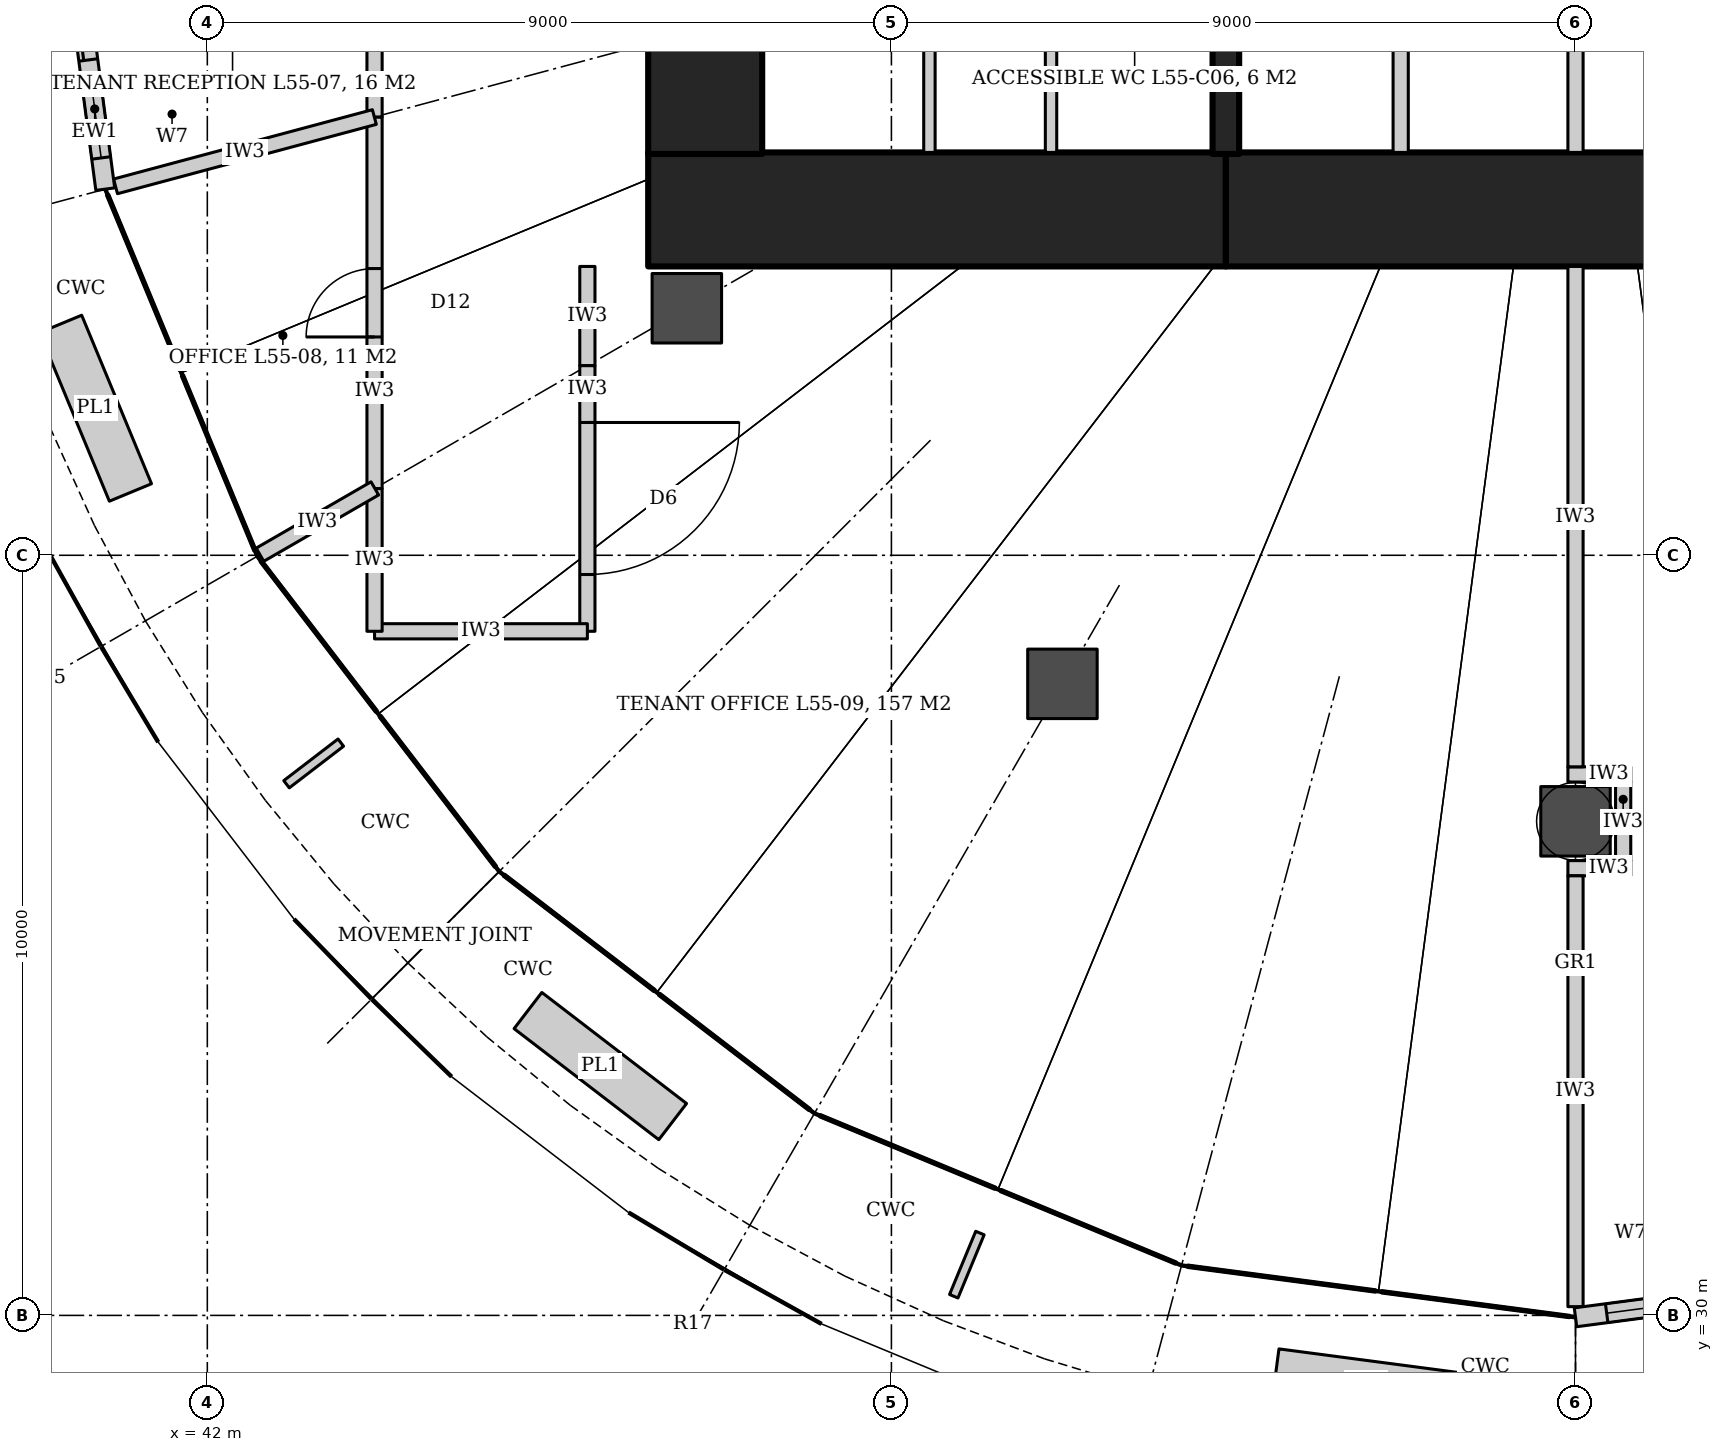
"""IFC4 building model, lengths in metres.
Left out: names, types, materials, properties, quantities, classifications, styles, units other than length and angle.
Written with IfcOpenShell. Run it as: python <this file> out.ifc"""

import sys

from ifc_helpers import new_model, si_unit, direction, frame, frame_2d, origin, origin_2d, place, context, subcontext, project, spatial, rectangle, hollow_circle, extrude, element, fill, save


model = new_model("IFC4")
c1 = context("Model", 3, precision=1e-05, world=origin(), true_north=direction((0.0, 1.0)))
c2 = subcontext(c1, "Body", "Model", "MODEL_VIEW")
j1 = project(units=[si_unit("LENGTHUNIT", "METRE"), si_unit("PLANEANGLEUNIT", "RADIAN")], contexts=[c1])
p1 = place(None, origin())
s1 = spatial("IfcSite", under=j1, at=p1, CompositionType="ELEMENT")
p2 = place(p1, origin())
s2 = spatial("IfcBuilding", under=s1, at=p2, CompositionType="ELEMENT")
p3 = place(p2, frame((0.0, 0.0, 240.2)))
s3 = spatial("IfcBuildingStorey", under=s2, at=p3, CompositionType="ELEMENT", Elevation=240.2)
p4 = place(p3, frame((47.8, 44.55, 0.0), z_axis=(0.0, 0.0, 1.0), x_axis=(1.0, 0.0, 0.0)))
e1 = element("IfcWall", 1, at=p4, inside=s3, PredefinedType="SHEAR", context=c2, shape_type="SweptSolid", body=[
    extrude(rectangle(XDim=7.6, YDim=1.5, at=frame_2d((3.8, 0.0))), origin(), (0.0, 0.0, 1.0), 4.2),
])
p5 = place(p3, frame((55.4, 44.55, 0.0), z_axis=(0.0, 0.0, 1.0), x_axis=(1.0, 0.0, 0.0)))
e2 = element("IfcWall", 2, at=p5, inside=s3, PredefinedType="SHEAR", context=c2, shape_type="SweptSolid", body=[
    extrude(rectangle(XDim=9.2, YDim=1.5, at=frame_2d((4.6, 0.0))), origin(), (0.0, 0.0, 1.0), 4.2),
])
p6 = place(p3, frame((48.55, 45.28, 0.0), z_axis=(0.0, 0.0, 1.0), x_axis=(0.0, 1.0, 0.0)))
e3 = element("IfcWall", 3, at=p6, inside=s3, PredefinedType="SHEAR", context=c2, shape_type="SweptSolid", body=[
    extrude(rectangle(XDim=3.22, YDim=1.5, at=frame_2d((1.61, 0.0))), origin(), (0.0, 0.0, 1.0), 4.2),
])
p7 = place(p3, frame((55.4, 48.345, 0.0), z_axis=(0.0, 0.0, 1.0), x_axis=(0.0, -1.0, 0.0)))
e4 = element("IfcWall", 4, at=p7, inside=s3, PredefinedType="SHEAR", context=c2, shape_type="SweptSolid", body=[
    extrude(rectangle(XDim=3.065, YDim=0.35, at=frame_2d((1.532, 0.0))), origin(), (0.0, 0.0, 1.0), 4.2),
])
for number, where, z_axis, x_axis in (
    (5, (48.309, 43.25, 0.0), (0.0, 0.0, 1.0), (1.0, 0.0, 0.0)),
    (6, (53.25, 38.309, 0.0), (0.0, 0.0, 1.0), (1.0, 0.0, 0.0)),
    (7, (60.0, 36.5, 0.0), (0.0, 0.0, 1.0), (1.0, 0.0, 0.0)),
):
    element("IfcColumn", number, at=place(p3, frame(where, z_axis=z_axis, x_axis=x_axis)), inside=s3, PredefinedType="COLUMN", context=c2, shape_type="SweptSolid", body=[
        extrude(hollow_circle(Radius=0.457, WallThickness=0.045, at=origin_2d()), origin(), (0.0, 0.0, 1.0), 4.2),
    ])
p8 = place(p3, frame((47.0, 43.8, 0.0), z_axis=(0.0, 0.0, 1.0), x_axis=(0.0, -1.0, 0.0)))
e8 = element("IfcWall", 8, at=p8, inside=s3, PredefinedType="PARTITIONING", context=c2, shape_type="SweptSolid", body=[
    extrude(rectangle(XDim=1.306, YDim=0.2, at=frame_2d((0.653, 0.0))), origin(), (0.0, 0.0, 1.0), 3.02),
])
p9 = place(p3, frame((47.0, 42.494, 0.0), z_axis=(0.0, 0.0, 1.0), x_axis=(0.0, -1.0, 0.0)))
e9 = element("IfcWall", 9, at=p9, inside=s3, PredefinedType="PARTITIONING", context=c2, shape_type="SweptSolid", body=[
    extrude(rectangle(XDim=3.494, YDim=0.2, at=frame_2d((1.747, 0.0))), origin(), (0.0, 0.0, 1.0), 3.02),
])
p10 = place(p9, frame((0.747, 0.0, 0.0)))
e10 = element("IfcOpeningElement", 10, at=p10, cuts=e9, PredefinedType="OPENING", context=c2, shape_type="SweptSolid", body=[
    extrude(rectangle(XDim=2.0, YDim=2.1, at=frame_2d((1.0, 1.05))), frame((0.0, 0.11, 0.0), z_axis=(0.0, -1.0, 0.0), x_axis=(1.0, 0.0, 0.0)), (0.0, 0.0, 1.0), 0.22),
])
p11 = place(p3, frame((47.0, 39.0, 0.0), z_axis=(0.0, 0.0, 1.0), x_axis=(-1.0, 0.0, 0.0)))
e11 = element("IfcWall", 11, at=p11, inside=s3, PredefinedType="PARTITIONING", context=c2, shape_type="SweptSolid", body=[
    extrude(rectangle(XDim=2.8, YDim=0.2, at=frame_2d((1.4, 0.0))), origin(), (0.0, 0.0, 1.0), 3.04),
])
p12 = place(p3, frame((44.2, 39.0, 0.0), z_axis=(0.0, 0.0, 1.0), x_axis=(0.0, 1.0, 0.0)))
e12 = element("IfcWall", 12, at=p12, inside=s3, PredefinedType="PARTITIONING", context=c2, shape_type="SweptSolid", body=[
    extrude(rectangle(XDim=1.878, YDim=0.2, at=frame_2d((0.939, 0.0))), origin(), (0.0, 0.0, 1.0), 3.02),
])
p13 = place(p3, frame((44.2, 40.878, 0.0), z_axis=(0.0, 0.0, 1.0), x_axis=(0.0, 1.0, 0.0)))
e13 = element("IfcWall", 13, at=p13, inside=s3, PredefinedType="PARTITIONING", context=c2, shape_type="SweptSolid", body=[
    extrude(rectangle(XDim=4.888, YDim=0.2, at=frame_2d((2.444, 0.0))), origin(), (0.0, 0.0, 1.0), 3.02),
])
p14 = place(p13, frame((1.994, 0.0, 0.0)))
e14 = element("IfcOpeningElement", 14, at=p14, cuts=e13, PredefinedType="OPENING", context=c2, shape_type="SweptSolid", body=[
    extrude(rectangle(XDim=0.9, YDim=2.4, at=frame_2d((0.45, 1.2))), frame((0.0, 0.11, 0.0), z_axis=(0.0, -1.0, 0.0), x_axis=(1.0, 0.0, 0.0)), (0.0, 0.0, 1.0), 0.22),
])
p15 = place(p3, frame((44.2, 45.766, 0.0), z_axis=(0.0, 0.0, 1.0), x_axis=(0.0, 1.0, 0.0)))
e15 = element("IfcWall", 15, at=p15, inside=s3, PredefinedType="PARTITIONING", context=c2, shape_type="SweptSolid", body=[
    extrude(rectangle(XDim=4.234, YDim=0.2, at=frame_2d((2.117, 0.0))), origin(), (0.0, 0.0, 1.0), 3.02),
])
p16 = place(p15, frame((1.317, 0.0, 0.0)))
e16 = element("IfcOpeningElement", 16, at=p16, cuts=e15, PredefinedType="OPENING", context=c2, shape_type="SweptSolid", body=[
    extrude(rectangle(XDim=1.6, YDim=2.4, at=frame_2d((0.8, 1.2))), frame((0.0, 0.11, 0.0), z_axis=(0.0, -1.0, 0.0), x_axis=(1.0, 0.0, 0.0)), (0.0, 0.0, 1.0), 0.22),
])
p17 = place(p3, frame((44.198, 45.766, 0.0), z_axis=(0.0, 0.0, 1.0), x_axis=(-0.965944651358, -0.258748778768, 0.0)))
e17 = element("IfcWall", 17, at=p17, inside=s3, PredefinedType="PARTITIONING", context=c2, shape_type="SweptSolid", body=[
    extrude(rectangle(XDim=3.525, YDim=0.2, at=frame_2d((1.763, 0.0))), origin(), (0.0, 0.0, 1.0), 3.02),
])
p18 = place(p3, frame((44.204, 40.88, 0.0), z_axis=(0.0, 0.0, 1.0), x_axis=(-0.866073756611, -0.499916241094, 0.0)))
e18 = element("IfcWall", 18, at=p18, inside=s3, PredefinedType="PARTITIONING", context=c2, shape_type="SweptSolid", body=[
    extrude(rectangle(XDim=1.745, YDim=0.2, at=frame_2d((0.873, 0.0))), origin(), (0.0, 0.0, 1.0), 3.02),
])
for number, where, z_axis, x_axis in (
    (19, (59.9, 37.117, 0.0), (0.0, 0.0, 1.0), (1.0, 0.0, 0.0)),
    (20, (59.9, 35.883, 0.0), (0.0, 0.0, 1.0), (1.0, 0.0, 0.0)),
):
    element("IfcWall", number, at=place(p3, frame(where, z_axis=z_axis, x_axis=x_axis)), inside=s3, PredefinedType="PARTITIONING", context=c2, shape_type="SweptSolid", body=[
        extrude(rectangle(XDim=0.827, YDim=0.2, at=frame_2d((0.414, 0.0))), origin(), (0.0, 0.0, 1.0), 3.02),
    ])
p19 = place(p3, frame((60.627, 37.017, 0.0), z_axis=(0.0, 0.0, 1.0), x_axis=(0.0, -1.0, 0.0)))
e21 = element("IfcWall", 21, at=p19, inside=s3, PredefinedType="PARTITIONING", context=c2, shape_type="SweptSolid", body=[
    extrude(rectangle(XDim=1.034, YDim=0.2, at=frame_2d((0.517, 0.0))), origin(), (0.0, 0.0, 1.0), 3.02),
])
p20 = place(p3, frame((60.0, 43.8, 0.0), z_axis=(0.0, 0.0, 1.0), x_axis=(0.0, -1.0, 0.0)))
e22 = element("IfcWall", 22, at=p20, inside=s3, PredefinedType="PARTITIONING", context=c2, shape_type="SweptSolid", body=[
    extrude(rectangle(XDim=6.583, YDim=0.2, at=frame_2d((3.292, 0.0))), origin(), (0.0, 0.0, 1.0), 3.04),
])
p21 = place(p3, frame((60.0, 35.783, 0.0), z_axis=(0.0, 0.0, 1.0), x_axis=(0.0, -1.0, 0.0)))
e23 = element("IfcWall", 23, at=p21, inside=s3, PredefinedType="PARTITIONING", context=c2, shape_type="SweptSolid", body=[
    extrude(rectangle(XDim=5.668, YDim=0.2, at=frame_2d((2.834, 0.0))), origin(), (0.0, 0.0, 1.0), 3.02),
])
p22 = place(p3, frame((39.975, 50.0, 0.0), z_axis=(0.0, 0.0, 1.0), x_axis=(0.130487131216, -0.99145000307, 0.0)))
e24 = element("IfcWall", 24, at=p22, inside=s3, PredefinedType="SOLIDWALL", context=c2, shape_type="SweptSolid", body=[
    extrude(rectangle(XDim=5.228, YDim=0.25, at=frame_2d((2.614, 0.0))), origin(), (0.0, 0.0, 1.0), 4.04),
])
p23 = place(p22, frame((1.714, 0.0, 0.0)))
e25 = element("IfcOpeningElement", 25, at=p23, cuts=e24, PredefinedType="OPENING", context=c2, shape_type="SweptSolid", body=[
    extrude(rectangle(XDim=1.8, YDim=2.4, at=frame_2d((0.9, 1.2))), frame((0.0, 0.135, 0.0), z_axis=(0.0, -1.0, 0.0), x_axis=(1.0, 0.0, 0.0)), (0.0, 0.0, 1.0), 0.27),
])
p24 = place(p22, frame((0.414, 0.0, 0.0)))
e26 = element("IfcOpeningElement", 26, at=p24, cuts=e24, PredefinedType="OPENING", context=c2, shape_type="SweptSolid", body=[
    extrude(rectangle(XDim=0.9, YDim=2.4, at=frame_2d((0.45, 1.2))), frame((0.0, 0.135, 0.0), z_axis=(0.0, -1.0, 0.0), x_axis=(1.0, 0.0, 0.0)), (0.0, 0.0, 1.0), 0.27),
])
p25 = place(p22, frame((3.914, 0.0, 0.0)))
e27 = element("IfcOpeningElement", 27, at=p25, cuts=e24, PredefinedType="OPENING", context=c2, shape_type="SweptSolid", body=[
    extrude(rectangle(XDim=0.9, YDim=2.4, at=frame_2d((0.45, 1.2))), frame((0.0, 0.135, 0.0), z_axis=(0.0, -1.0, 0.0), x_axis=(1.0, 0.0, 0.0)), (0.0, 0.0, 1.0), 0.27),
])
p26 = place(p3, frame((60.0, 29.975, 0.0), z_axis=(0.0, 0.0, 1.0), x_axis=(0.99145000307, 0.130487131216, 0.0)))
e28 = element("IfcWall", 28, at=p26, inside=s3, PredefinedType="SOLIDWALL", context=c2, shape_type="SweptSolid", body=[
    extrude(rectangle(XDim=5.228, YDim=0.25, at=frame_2d((2.614, 0.0))), origin(), (0.0, 0.0, 1.0), 4.04),
])
p27 = place(p26, frame((1.714, 0.0, 0.0)))
e29 = element("IfcOpeningElement", 29, at=p27, cuts=e28, PredefinedType="OPENING", context=c2, shape_type="SweptSolid", body=[
    extrude(rectangle(XDim=1.8, YDim=2.4, at=frame_2d((0.9, 1.2))), frame((0.0, 0.135, 0.0), z_axis=(0.0, -1.0, 0.0), x_axis=(1.0, 0.0, 0.0)), (0.0, 0.0, 1.0), 0.27),
])
p28 = place(p26, frame((0.414, 0.0, 0.0)))
e30 = element("IfcOpeningElement", 30, at=p28, cuts=e28, PredefinedType="OPENING", context=c2, shape_type="SweptSolid", body=[
    extrude(rectangle(XDim=0.9, YDim=2.4, at=frame_2d((0.45, 1.2))), frame((0.0, 0.135, 0.0), z_axis=(0.0, -1.0, 0.0), x_axis=(1.0, 0.0, 0.0)), (0.0, 0.0, 1.0), 0.27),
])
p29 = place(p26, frame((3.914, 0.0, 0.0)))
e31 = element("IfcOpeningElement", 31, at=p29, cuts=e28, PredefinedType="OPENING", context=c2, shape_type="SweptSolid", body=[
    extrude(rectangle(XDim=0.9, YDim=2.4, at=frame_2d((0.45, 1.2))), frame((0.0, 0.135, 0.0), z_axis=(0.0, -1.0, 0.0), x_axis=(1.0, 0.0, 0.0)), (0.0, 0.0, 1.0), 0.27),
])
for number, where, z_axis, x_axis in (
    (32, (57.7, 45.3, 0.0), (0.0, 0.0, 1.0), (0.0, 1.0, 0.0)),
    (33, (60.0, 45.3, 0.0), (0.0, 0.0, 1.0), (0.0, 1.0, 0.0)),
):
    element("IfcWall", number, at=place(p3, frame(where, z_axis=z_axis, x_axis=x_axis)), inside=s3, PredefinedType="PARTITIONING", context=c2, shape_type="SweptSolid", body=[
        extrude(rectangle(XDim=3.025, YDim=0.2, at=frame_2d((1.512, 0.0))), origin(), (0.0, 0.0, 1.0), 4.2),
    ])
for number, where, z_axis, x_axis in (
    (34, (51.5, 45.3, 0.0), (0.0, 0.0, 1.0), (0.0, 1.0, 0.0)),
    (35, (53.1, 45.3, 0.0), (0.0, 0.0, 1.0), (0.0, 1.0, 0.0)),
):
    element("IfcWall", number, at=place(p3, frame(where, z_axis=z_axis, x_axis=x_axis)), inside=s3, PredefinedType="PARTITIONING", context=c2, shape_type="SweptSolid", body=[
        extrude(rectangle(XDim=3.025, YDim=0.15, at=frame_2d((1.512, 0.0))), origin(), (0.0, 0.0, 1.0), 4.04),
    ])
p30 = place(p14, origin())
e36 = element("IfcDoor", 36, at=p30, inside=s3, OperationType="SINGLE_SWING_LEFT", PredefinedType="DOOR", context=c2, shape_type="SweptSolid", body=[
    extrude(rectangle(XDim=0.9, YDim=2.4, at=frame_2d((0.45, 1.2))), frame((0.0, 0.025, 0.0), z_axis=(0.0, -1.0, 0.0), x_axis=(1.0, 0.0, 0.0)), (0.0, 0.0, 1.0), 0.05),
])
fill(e14, e36)
p31 = place(p10, origin())
e37 = element("IfcDoor", 37, at=p31, inside=s3, OperationType="DOUBLE_DOOR_DOUBLE_SWING", PredefinedType="DOOR", context=c2, shape_type="SweptSolid", body=[
    extrude(rectangle(XDim=2.0, YDim=2.1, at=frame_2d((1.0, 1.05))), frame((0.0, 0.025, 0.0), z_axis=(0.0, -1.0, 0.0), x_axis=(1.0, 0.0, 0.0)), (0.0, 0.0, 1.0), 0.05),
])
fill(e10, e37)
p32 = place(p23, origin())
e38 = element("IfcDoor", 38, at=p32, inside=s3, OperationType="DOUBLE_DOOR_SLIDING", PredefinedType="DOOR", context=c2, shape_type="SweptSolid", body=[
    extrude(rectangle(XDim=1.8, YDim=2.4, at=frame_2d((0.9, 1.2))), frame((0.0, 0.025, 0.0), z_axis=(0.0, -1.0, 0.0), x_axis=(1.0, 0.0, 0.0)), (0.0, 0.0, 1.0), 0.05),
])
fill(e25, e38)
p33 = place(p25, origin())
e39 = element("IfcWindow", 39, at=p33, inside=s3, PartitioningType="SINGLE_PANEL", PredefinedType="WINDOW", context=c2, shape_type="SweptSolid", body=[
    extrude(rectangle(XDim=0.9, YDim=2.4, at=frame_2d((0.45, 1.2))), frame((0.0, 0.03, 0.0), z_axis=(0.0, -1.0, 0.0), x_axis=(1.0, 0.0, 0.0)), (0.0, 0.0, 1.0), 0.06),
])
fill(e27, e39)
p34 = place(p28, origin())
e40 = element("IfcWindow", 40, at=p34, inside=s3, PartitioningType="SINGLE_PANEL", PredefinedType="WINDOW", context=c2, shape_type="SweptSolid", body=[
    extrude(rectangle(XDim=0.9, YDim=2.4, at=frame_2d((0.45, 1.2))), frame((0.0, 0.03, 0.0), z_axis=(0.0, -1.0, 0.0), x_axis=(1.0, 0.0, 0.0)), (0.0, 0.0, 1.0), 0.06),
])
fill(e30, e40)
save(model, sys.argv[1])
